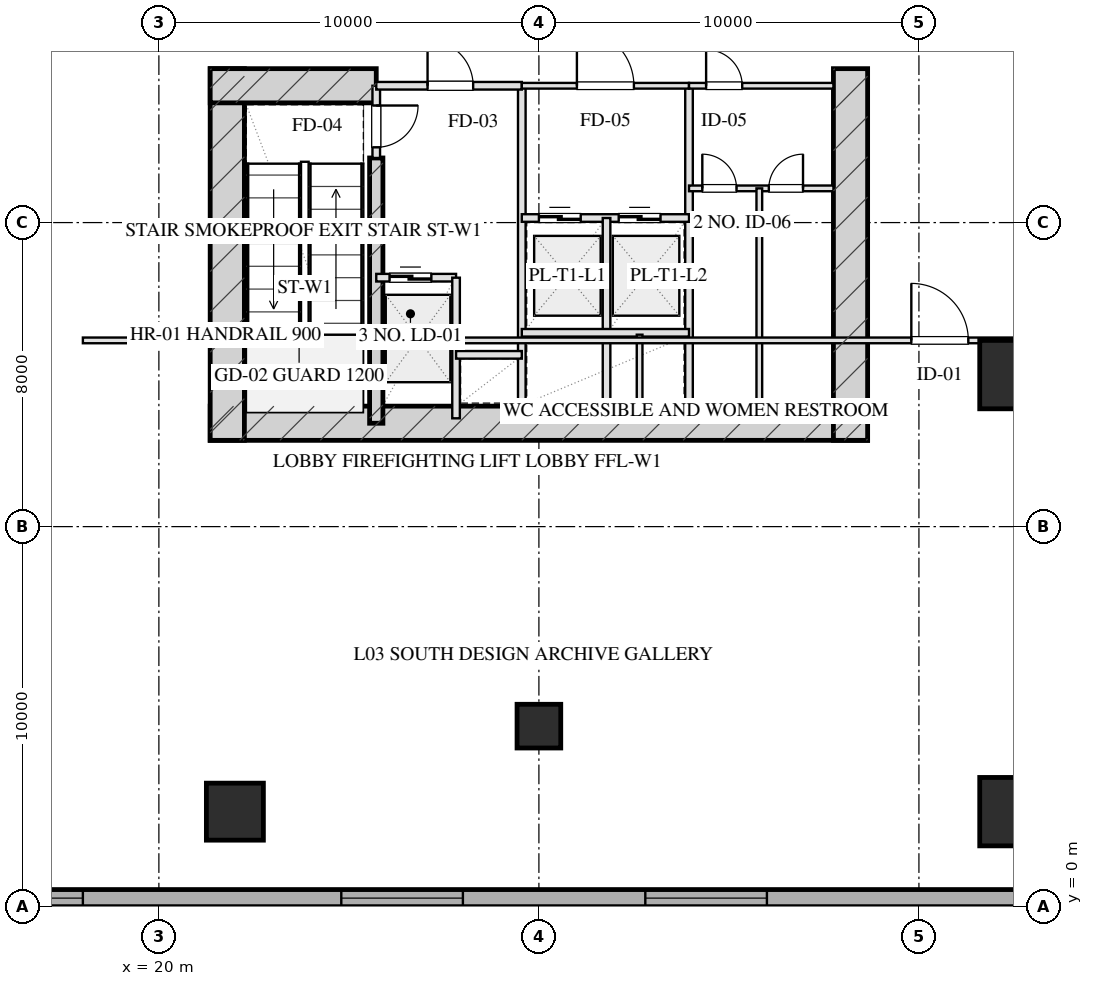
"""IFC4 building model, lengths in metres.
Left out: names, types, materials, properties, quantities, classifications, styles, units other than length and angle.
Written with IfcOpenShell. Run it as: python <this file> out.ifc"""

import sys

from ifc_helpers import new_model, si_unit, direction, frame, frame_2d, origin, origin_2d, place, context, subcontext, project, spatial, rectangle, hollow_rectangle, extrude, element, fill, save


model = new_model("IFC4")
c1 = context("Model", 3, precision=1e-05, world=origin(), true_north=direction((0.0, 1.0)))
c2 = subcontext(c1, "Body", "Model", "MODEL_VIEW")
j1 = project(units=[si_unit("LENGTHUNIT", "METRE"), si_unit("PLANEANGLEUNIT", "RADIAN")], contexts=[c1])
p1 = place(None, origin())
s1 = spatial("IfcSite", under=j1, at=p1, CompositionType="ELEMENT")
p2 = place(p1, origin())
s2 = spatial("IfcBuilding", under=s1, at=p2, CompositionType="ELEMENT")
p3 = place(p2, frame((0.0, 0.0, 16.5)))
s3 = spatial("IfcBuildingStorey", under=s2, at=p3, CompositionType="ELEMENT", Elevation=16.5)
p4 = place(p3, frame((21.35, 12.72, 0.0), z_axis=(0.0, 0.0, 1.0), x_axis=(1.0, 0.0, 0.0)))
e1 = element("IfcWall", 1, at=p4, inside=s3, PredefinedType="SHEAR", context=c2, shape_type="SweptSolid", body=[
    extrude(rectangle(XDim=17.3, YDim=0.9, at=frame_2d((8.65, 0.0))), origin(), (0.0, 0.0, 1.0), 5.5),
])
for number, where, z_axis, x_axis in (
    (2, (21.8, 22.05, 0.0), (0.0, 0.0, 1.0), (0.0, -1.0, 0.0)),
    (3, (38.2, 22.05, 0.0), (0.0, 0.0, 1.0), (0.0, -1.0, 0.0)),
):
    element("IfcWall", number, at=place(p3, frame(where, z_axis=z_axis, x_axis=x_axis)), inside=s3, PredefinedType="SHEAR", context=c2, shape_type="SweptSolid", body=[
        extrude(rectangle(XDim=9.78, YDim=0.9, at=frame_2d((4.89, 0.0))), origin(), (0.0, 0.0, 1.0), 5.5),
    ])
p5 = place(p3, frame((25.72, 19.7, 0.0), z_axis=(0.0, 0.0, 1.0), x_axis=(0.0, -1.0, 0.0)))
e4 = element("IfcWall", 4, at=p5, inside=s3, PredefinedType="SHEAR", context=c2, shape_type="SweptSolid", body=[
    extrude(rectangle(XDim=6.98, YDim=0.35, at=frame_2d((3.49, 0.0))), origin(), (0.0, 0.0, 1.0), 5.5),
])
p6 = place(p3, frame((21.35, 21.6, 0.0), z_axis=(0.0, 0.0, 1.0), x_axis=(1.0, 0.0, 0.0)))
e5 = element("IfcWall", 5, at=p6, inside=s3, PredefinedType="SHEAR", context=c2, shape_type="SweptSolid", body=[
    extrude(rectangle(XDim=4.37, YDim=0.9, at=frame_2d((2.185, 0.0))), origin(), (0.0, 0.0, 1.0), 5.5),
])
p7 = place(p3, frame((22.0, 2.5, 0.0), z_axis=(0.0, 0.0, 1.0), x_axis=(1.0, 0.0, 0.0)))
e6 = element("IfcColumn", 6, at=p7, inside=s3, PredefinedType="COLUMN", context=c2, shape_type="SweptSolid", body=[
    extrude(rectangle(XDim=1.5, YDim=1.5, at=origin_2d()), origin(), (0.0, 0.0, 1.0), 5.501),
])
for number, where, z_axis, x_axis in (
    (7, (42.5, 2.5, 0.0), (0.0, 0.0, 1.0), (1.0, 0.0, 0.0)),
    (8, (42.5, 14.0, 0.0), (0.0, 0.0, 1.0), (1.0, 0.0, 0.0)),
):
    element("IfcColumn", number, at=place(p3, frame(where, z_axis=z_axis, x_axis=x_axis)), inside=s3, PredefinedType="COLUMN", context=c2, shape_type="SweptSolid", body=[
        extrude(hollow_rectangle(XDim=1.8, YDim=1.8, WallThickness=0.06, at=origin_2d()), origin(), (0.0, 0.0, 1.0), 5.501),
    ])
p8 = place(p3, frame((30.0, 4.75, 0.0), z_axis=(0.0, 0.0, 1.0), x_axis=(1.0, 0.0, 0.0)))
e9 = element("IfcColumn", 9, at=p8, inside=s3, PredefinedType="COLUMN", context=c2, shape_type="SweptSolid", body=[
    extrude(hollow_rectangle(XDim=1.15, YDim=1.15, WallThickness=0.04, at=origin_2d()), origin(), (0.0, 0.0, 1.0), 5.501),
])
p9 = place(p3, frame((120.0, 0.225, 0.0), z_axis=(0.0, 0.0, 1.0), x_axis=(-1.0, 0.0, 0.0)))
e10 = element("IfcWall", 10, at=p9, inside=s3, PredefinedType="SOLIDWALL", context=c2, shape_type="SweptSolid", body=[
    extrude(rectangle(XDim=120.0, YDim=0.45, at=frame_2d((60.0, 0.0))), origin(), (0.0, 0.0, 1.0), 5.2),
])
p10 = place(p9, frame((8.0, 0.0, 0.7)))
e11 = element("IfcOpeningElement", 11, at=p10, cuts=e10, PredefinedType="OPENING", context=c2, shape_type="SweptSolid", body=[
    extrude(rectangle(XDim=3.2, YDim=2.05, at=frame_2d((1.6, 1.025))), frame((0.0, 0.235, 0.0), z_axis=(0.0, -1.0, 0.0), x_axis=(1.0, 0.0, 0.0)), (0.0, 0.0, 1.0), 0.47),
])
p11 = place(p9, frame((16.0, 0.0, 0.7)))
e12 = element("IfcOpeningElement", 12, at=p11, cuts=e10, PredefinedType="OPENING", context=c2, shape_type="SweptSolid", body=[
    extrude(rectangle(XDim=3.2, YDim=2.05, at=frame_2d((1.6, 1.025))), frame((0.0, 0.235, 0.0), z_axis=(0.0, -1.0, 0.0), x_axis=(1.0, 0.0, 0.0)), (0.0, 0.0, 1.0), 0.47),
])
p12 = place(p9, frame((26.0, 0.0, 0.7)))
e13 = element("IfcOpeningElement", 13, at=p12, cuts=e10, PredefinedType="OPENING", context=c2, shape_type="SweptSolid", body=[
    extrude(rectangle(XDim=3.2, YDim=2.05, at=frame_2d((1.6, 1.025))), frame((0.0, 0.235, 0.0), z_axis=(0.0, -1.0, 0.0), x_axis=(1.0, 0.0, 0.0)), (0.0, 0.0, 1.0), 0.47),
])
p13 = place(p9, frame((34.0, 0.0, 0.7)))
e14 = element("IfcOpeningElement", 14, at=p13, cuts=e10, PredefinedType="OPENING", context=c2, shape_type="SweptSolid", body=[
    extrude(rectangle(XDim=3.2, YDim=2.05, at=frame_2d((1.6, 1.025))), frame((0.0, 0.235, 0.0), z_axis=(0.0, -1.0, 0.0), x_axis=(1.0, 0.0, 0.0)), (0.0, 0.0, 1.0), 0.47),
])
p14 = place(p9, frame((84.0, 0.0, 0.7)))
e15 = element("IfcOpeningElement", 15, at=p14, cuts=e10, PredefinedType="OPENING", context=c2, shape_type="SweptSolid", body=[
    extrude(rectangle(XDim=3.2, YDim=2.05, at=frame_2d((1.6, 1.025))), frame((0.0, 0.235, 0.0), z_axis=(0.0, -1.0, 0.0), x_axis=(1.0, 0.0, 0.0)), (0.0, 0.0, 1.0), 0.47),
])
p15 = place(p9, frame((92.0, 0.0, 0.7)))
e16 = element("IfcOpeningElement", 16, at=p15, cuts=e10, PredefinedType="OPENING", context=c2, shape_type="SweptSolid", body=[
    extrude(rectangle(XDim=3.2, YDim=2.05, at=frame_2d((1.6, 1.025))), frame((0.0, 0.235, 0.0), z_axis=(0.0, -1.0, 0.0), x_axis=(1.0, 0.0, 0.0)), (0.0, 0.0, 1.0), 0.47),
])
p16 = place(p9, frame((102.0, 0.0, 0.7)))
e17 = element("IfcOpeningElement", 17, at=p16, cuts=e10, PredefinedType="OPENING", context=c2, shape_type="SweptSolid", body=[
    extrude(rectangle(XDim=3.2, YDim=2.05, at=frame_2d((1.6, 1.025))), frame((0.0, 0.235, 0.0), z_axis=(0.0, -1.0, 0.0), x_axis=(1.0, 0.0, 0.0)), (0.0, 0.0, 1.0), 0.47),
])
p17 = place(p9, frame((110.0, 0.0, 0.7)))
e18 = element("IfcOpeningElement", 18, at=p17, cuts=e10, PredefinedType="OPENING", context=c2, shape_type="SweptSolid", body=[
    extrude(rectangle(XDim=3.2, YDim=2.05, at=frame_2d((1.6, 1.025))), frame((0.0, 0.235, 0.0), z_axis=(0.0, -1.0, 0.0), x_axis=(1.0, 0.0, 0.0)), (0.0, 0.0, 1.0), 0.47),
])
p18 = place(p3, frame((25.72, 21.6, 0.0), z_axis=(0.0, 0.0, 1.0), x_axis=(0.0, -1.0, 0.0)))
e19 = element("IfcWall", 19, at=p18, inside=s3, PredefinedType="PARTITIONING", context=c2, shape_type="SweptSolid", body=[
    extrude(rectangle(XDim=1.9, YDim=0.2, at=frame_2d((0.95, 0.0))), origin(), (0.0, 0.0, 1.0), 5.185),
])
p19 = place(p18, frame((0.52, 0.0, 0.0)))
e20 = element("IfcOpeningElement", 20, at=p19, cuts=e19, PredefinedType="OPENING", context=c2, shape_type="SweptSolid", body=[
    extrude(rectangle(XDim=1.1, YDim=2.05, at=frame_2d((0.55, 1.025))), frame((0.0, 0.11, 0.0), z_axis=(0.0, -1.0, 0.0), x_axis=(1.0, 0.0, 0.0)), (0.0, 0.0, 1.0), 0.22),
])
p20 = place(p3, frame((29.55, 21.6, 0.0), z_axis=(0.0, 0.0, 1.0), x_axis=(0.0, -1.0, 0.0)))
e21 = element("IfcWall", 21, at=p20, inside=s3, PredefinedType="PARTITIONING", context=c2, shape_type="SweptSolid", body=[
    extrude(rectangle(XDim=8.43, YDim=0.2, at=frame_2d((4.215, 0.0))), origin(), (0.0, 0.0, 1.0), 5.185),
])
p21 = place(p3, frame((25.72, 21.6, 0.0), z_axis=(0.0, 0.0, 1.0), x_axis=(1.0, 0.0, 0.0)))
e22 = element("IfcWall", 22, at=p21, inside=s3, PredefinedType="PARTITIONING", context=c2, shape_type="SweptSolid", body=[
    extrude(rectangle(XDim=3.83, YDim=0.2, at=frame_2d((1.915, 0.0))), origin(), (0.0, 0.0, 1.0), 5.185),
])
p22 = place(p21, frame((1.35, 0.0, 0.0)))
e23 = element("IfcOpeningElement", 23, at=p22, cuts=e22, PredefinedType="OPENING", context=c2, shape_type="SweptSolid", body=[
    extrude(rectangle(XDim=1.2, YDim=2.05, at=frame_2d((0.6, 1.025))), frame((0.0, 0.11, 0.0), z_axis=(0.0, -1.0, 0.0), x_axis=(1.0, 0.0, 0.0)), (0.0, 0.0, 1.0), 0.22),
])
p23 = place(p3, frame((25.72, 16.55, 0.0), z_axis=(0.0, 0.0, 1.0), x_axis=(1.0, 0.0, 0.0)))
e24 = element("IfcWall", 24, at=p23, inside=s3, PredefinedType="PARTITIONING", context=c2, shape_type="SweptSolid", body=[
    extrude(rectangle(XDim=2.1, YDim=0.2, at=frame_2d((1.05, 0.0))), origin(), (0.0, 0.0, 1.0), 5.185),
])
p24 = place(p23, frame((0.35, 0.0, 0.0)))
e25 = element("IfcOpeningElement", 25, at=p24, cuts=e24, PredefinedType="OPENING", context=c2, shape_type="SweptSolid", body=[
    extrude(rectangle(XDim=1.1, YDim=2.05, at=frame_2d((0.55, 1.025))), frame((0.0, 0.11, 0.0), z_axis=(0.0, -1.0, 0.0), x_axis=(1.0, 0.0, 0.0)), (0.0, 0.0, 1.0), 0.22),
])
p25 = place(p3, frame((27.82, 16.55, 0.0), z_axis=(0.0, 0.0, 1.0), x_axis=(0.0, -1.0, 0.0)))
e26 = element("IfcWall", 26, at=p25, inside=s3, PredefinedType="PARTITIONING", context=c2, shape_type="SweptSolid", body=[
    extrude(rectangle(XDim=3.7, YDim=0.2, at=frame_2d((1.85, 0.0))), origin(), (0.0, 0.0, 1.0), 5.185),
])
p26 = place(p3, frame((27.82, 14.52, 0.0), z_axis=(0.0, 0.0, 1.0), x_axis=(1.0, 0.0, 0.0)))
e27 = element("IfcWall", 27, at=p26, inside=s3, PredefinedType="PARTITIONING", context=c2, shape_type="SweptSolid", body=[
    extrude(rectangle(XDim=1.73, YDim=0.2, at=frame_2d((0.865, 0.0))), origin(), (0.0, 0.0, 1.0), 5.185),
])
p27 = place(p3, frame((33.95, 21.6, 0.0), z_axis=(0.0, 0.0, 1.0), x_axis=(0.0, -1.0, 0.0)))
e28 = element("IfcWall", 28, at=p27, inside=s3, PredefinedType="PARTITIONING", context=c2, shape_type="SweptSolid", body=[
    extrude(rectangle(XDim=8.43, YDim=0.2, at=frame_2d((4.215, 0.0))), origin(), (0.0, 0.0, 1.0), 5.185),
])
p28 = place(p3, frame((29.55, 21.6, 0.0), z_axis=(0.0, 0.0, 1.0), x_axis=(1.0, 0.0, 0.0)))
e29 = element("IfcWall", 29, at=p28, inside=s3, PredefinedType="PARTITIONING", context=c2, shape_type="SweptSolid", body=[
    extrude(rectangle(XDim=4.4, YDim=0.15, at=frame_2d((2.2, 0.0))), origin(), (0.0, 0.0, 1.0), 5.185),
])
p29 = place(p28, frame((1.45, 0.0, 0.0)))
e30 = element("IfcOpeningElement", 30, at=p29, cuts=e29, PredefinedType="OPENING", context=c2, shape_type="SweptSolid", body=[
    extrude(rectangle(XDim=1.5, YDim=2.05, at=frame_2d((0.75, 1.025))), frame((0.0, 0.085, 0.0), z_axis=(0.0, -1.0, 0.0), x_axis=(1.0, 0.0, 0.0)), (0.0, 0.0, 1.0), 0.17),
])
p30 = place(p3, frame((29.55, 18.12, 0.0), z_axis=(0.0, 0.0, 1.0), x_axis=(1.0, 0.0, 0.0)))
e31 = element("IfcWall", 31, at=p30, inside=s3, PredefinedType="PARTITIONING", context=c2, shape_type="SweptSolid", body=[
    extrude(rectangle(XDim=4.4, YDim=0.2, at=frame_2d((2.2, 0.0))), origin(), (0.0, 0.0, 1.0), 5.185),
])
p31 = place(p30, frame((0.45, 0.0, 0.0)))
e32 = element("IfcOpeningElement", 32, at=p31, cuts=e31, PredefinedType="OPENING", context=c2, shape_type="SweptSolid", body=[
    extrude(rectangle(XDim=1.1, YDim=2.05, at=frame_2d((0.55, 1.025))), frame((0.0, 0.11, 0.0), z_axis=(0.0, -1.0, 0.0), x_axis=(1.0, 0.0, 0.0)), (0.0, 0.0, 1.0), 0.22),
])
p32 = place(p30, frame((2.55, 0.0, 0.0)))
e33 = element("IfcOpeningElement", 33, at=p32, cuts=e31, PredefinedType="OPENING", context=c2, shape_type="SweptSolid", body=[
    extrude(rectangle(XDim=1.1, YDim=2.05, at=frame_2d((0.55, 1.025))), frame((0.0, 0.11, 0.0), z_axis=(0.0, -1.0, 0.0), x_axis=(1.0, 0.0, 0.0)), (0.0, 0.0, 1.0), 0.22),
])
p33 = place(p3, frame((31.78, 18.12, 0.0), z_axis=(0.0, 0.0, 1.0), x_axis=(0.0, -1.0, 0.0)))
e34 = element("IfcWall", 34, at=p33, inside=s3, PredefinedType="PARTITIONING", context=c2, shape_type="SweptSolid", body=[
    extrude(rectangle(XDim=4.95, YDim=0.2, at=frame_2d((2.475, 0.0))), origin(), (0.0, 0.0, 1.0), 5.185),
])
p34 = place(p3, frame((29.55, 15.1, 0.0), z_axis=(0.0, 0.0, 1.0), x_axis=(1.0, 0.0, 0.0)))
e35 = element("IfcWall", 35, at=p34, inside=s3, PredefinedType="PARTITIONING", context=c2, shape_type="SweptSolid", body=[
    extrude(rectangle(XDim=4.4, YDim=0.2, at=frame_2d((2.2, 0.0))), origin(), (0.0, 0.0, 1.0), 5.185),
])
p35 = place(p3, frame((32.65, 15.05, 0.0), z_axis=(0.0, 0.0, 1.0), x_axis=(0.0, -1.0, 0.0)))
e36 = element("IfcWall", 36, at=p35, inside=s3, PredefinedType="PARTITIONING", context=c2, shape_type="SweptSolid", body=[
    extrude(rectangle(XDim=1.88, YDim=0.15, at=frame_2d((0.94, 0.0))), origin(), (0.0, 0.0, 1.0), 5.185),
])
p36 = place(p3, frame((33.95, 21.6, 0.0), z_axis=(0.0, 0.0, 1.0), x_axis=(1.0, 0.0, 0.0)))
e37 = element("IfcWall", 37, at=p36, inside=s3, PredefinedType="PARTITIONING", context=c2, shape_type="SweptSolid", body=[
    extrude(rectangle(XDim=3.8, YDim=0.15, at=frame_2d((1.9, 0.0))), origin(), (0.0, 0.0, 1.0), 5.185),
])
p37 = place(p36, frame((0.45, 0.0, 0.0)))
e38 = element("IfcOpeningElement", 38, at=p37, cuts=e37, PredefinedType="OPENING", context=c2, shape_type="SweptSolid", body=[
    extrude(rectangle(XDim=0.95, YDim=2.05, at=frame_2d((0.475, 1.025))), frame((0.0, 0.085, 0.0), z_axis=(0.0, -1.0, 0.0), x_axis=(1.0, 0.0, 0.0)), (0.0, 0.0, 1.0), 0.17),
])
p38 = place(p3, frame((33.95, 18.9, 0.0), z_axis=(0.0, 0.0, 1.0), x_axis=(1.0, 0.0, 0.0)))
e39 = element("IfcWall", 39, at=p38, inside=s3, PredefinedType="PARTITIONING", context=c2, shape_type="SweptSolid", body=[
    extrude(rectangle(XDim=3.8, YDim=0.15, at=frame_2d((1.9, 0.0))), origin(), (0.0, 0.0, 1.0), 5.185),
])
p39 = place(p38, frame((0.35, 0.0, 0.0)))
e40 = element("IfcOpeningElement", 40, at=p39, cuts=e39, PredefinedType="OPENING", context=c2, shape_type="SweptSolid", body=[
    extrude(rectangle(XDim=0.9, YDim=2.05, at=frame_2d((0.45, 1.025))), frame((0.0, 0.085, 0.0), z_axis=(0.0, -1.0, 0.0), x_axis=(1.0, 0.0, 0.0)), (0.0, 0.0, 1.0), 0.17),
])
p40 = place(p38, frame((2.1, 0.0, 0.0)))
e41 = element("IfcOpeningElement", 41, at=p40, cuts=e39, PredefinedType="OPENING", context=c2, shape_type="SweptSolid", body=[
    extrude(rectangle(XDim=0.9, YDim=2.05, at=frame_2d((0.45, 1.025))), frame((0.0, 0.085, 0.0), z_axis=(0.0, -1.0, 0.0), x_axis=(1.0, 0.0, 0.0)), (0.0, 0.0, 1.0), 0.17),
])
p41 = place(p3, frame((35.8, 18.9, 0.0), z_axis=(0.0, 0.0, 1.0), x_axis=(0.0, -1.0, 0.0)))
e42 = element("IfcWall", 42, at=p41, inside=s3, PredefinedType="PARTITIONING", context=c2, shape_type="SweptSolid", body=[
    extrude(rectangle(XDim=5.73, YDim=0.15, at=frame_2d((2.865, 0.0))), origin(), (0.0, 0.0, 1.0), 5.185),
])
p42 = place(p3, frame((18.0, 14.9, 0.0), z_axis=(0.0, 0.0, 1.0), x_axis=(1.0, 0.0, 0.0)))
e43 = element("IfcWall", 43, at=p42, inside=s3, PredefinedType="PARTITIONING", context=c2, shape_type="SweptSolid", body=[
    extrude(rectangle(XDim=88.0, YDim=0.15, at=frame_2d((44.0, 0.0))), origin(), (0.0, 0.0, 1.0), 2.325),
])
p43 = place(p42, frame((21.8, 0.0, 0.0)))
e44 = element("IfcOpeningElement", 44, at=p43, cuts=e43, PredefinedType="OPENING", context=c2, shape_type="SweptSolid", body=[
    extrude(rectangle(XDim=1.5, YDim=2.05, at=frame_2d((0.75, 1.025))), frame((0.0, 0.085, 0.0), z_axis=(0.0, -1.0, 0.0), x_axis=(1.0, 0.0, 0.0)), (0.0, 0.0, 1.0), 0.17),
])
p44 = place(p14, origin())
e45 = element("IfcWindow", 45, at=p44, inside=s3, PartitioningType="TRIPLE_PANEL_VERTICAL", PredefinedType="WINDOW", context=c2, shape_type="SweptSolid", body=[
    extrude(rectangle(XDim=3.2, YDim=2.05, at=frame_2d((1.6, 1.025))), frame((0.0, 0.03, 0.0), z_axis=(0.0, -1.0, 0.0), x_axis=(1.0, 0.0, 0.0)), (0.0, 0.0, 1.0), 0.06),
])
fill(e15, e45)
p45 = place(p15, origin())
e46 = element("IfcWindow", 46, at=p45, inside=s3, PartitioningType="TRIPLE_PANEL_VERTICAL", PredefinedType="WINDOW", context=c2, shape_type="SweptSolid", body=[
    extrude(rectangle(XDim=3.2, YDim=2.05, at=frame_2d((1.6, 1.025))), frame((0.0, 0.03, 0.0), z_axis=(0.0, -1.0, 0.0), x_axis=(1.0, 0.0, 0.0)), (0.0, 0.0, 1.0), 0.06),
])
fill(e16, e46)
p46 = place(p16, origin())
e47 = element("IfcWindow", 47, at=p46, inside=s3, PartitioningType="TRIPLE_PANEL_VERTICAL", PredefinedType="WINDOW", context=c2, shape_type="SweptSolid", body=[
    extrude(rectangle(XDim=3.2, YDim=2.05, at=frame_2d((1.6, 1.025))), frame((0.0, 0.03, 0.0), z_axis=(0.0, -1.0, 0.0), x_axis=(1.0, 0.0, 0.0)), (0.0, 0.0, 1.0), 0.06),
])
fill(e17, e47)
p47 = place(p19, origin())
e48 = element("IfcDoor", 48, at=p47, inside=s3, OperationType="SINGLE_SWING_LEFT", PredefinedType="DOOR", context=c2, shape_type="SweptSolid", body=[
    extrude(rectangle(XDim=1.1, YDim=2.05, at=frame_2d((0.55, 1.025))), frame((0.0, 0.025, 0.0), z_axis=(0.0, -1.0, 0.0), x_axis=(1.0, 0.0, 0.0)), (0.0, 0.0, 1.0), 0.05),
])
fill(e20, e48)
p48 = place(p22, origin())
e49 = element("IfcDoor", 49, at=p48, inside=s3, OperationType="SINGLE_SWING_LEFT", PredefinedType="DOOR", context=c2, shape_type="SweptSolid", body=[
    extrude(rectangle(XDim=1.2, YDim=2.05, at=frame_2d((0.6, 1.025))), frame((0.0, 0.025, 0.0), z_axis=(0.0, -1.0, 0.0), x_axis=(1.0, 0.0, 0.0)), (0.0, 0.0, 1.0), 0.05),
])
fill(e23, e49)
p49 = place(p24, origin())
e50 = element("IfcDoor", 50, at=p49, inside=s3, OperationType="DOUBLE_DOOR_SLIDING", PredefinedType="DOOR", context=c2, shape_type="SweptSolid", body=[
    extrude(rectangle(XDim=1.1, YDim=2.05, at=frame_2d((0.55, 1.025))), frame((0.0, 0.025, 0.0), z_axis=(0.0, -1.0, 0.0), x_axis=(1.0, 0.0, 0.0)), (0.0, 0.0, 1.0), 0.05),
])
fill(e25, e50)
p50 = place(p29, origin())
e51 = element("IfcDoor", 51, at=p50, inside=s3, OperationType="SINGLE_SWING_LEFT", PredefinedType="DOOR", context=c2, shape_type="SweptSolid", body=[
    extrude(rectangle(XDim=1.5, YDim=2.05, at=frame_2d((0.75, 1.025))), frame((0.0, 0.025, 0.0), z_axis=(0.0, -1.0, 0.0), x_axis=(1.0, 0.0, 0.0)), (0.0, 0.0, 1.0), 0.05),
])
fill(e30, e51)
p51 = place(p31, origin())
e52 = element("IfcDoor", 52, at=p51, inside=s3, OperationType="DOUBLE_DOOR_SLIDING", PredefinedType="DOOR", context=c2, shape_type="SweptSolid", body=[
    extrude(rectangle(XDim=1.1, YDim=2.05, at=frame_2d((0.55, 1.025))), frame((0.0, 0.025, 0.0), z_axis=(0.0, -1.0, 0.0), x_axis=(1.0, 0.0, 0.0)), (0.0, 0.0, 1.0), 0.05),
])
fill(e32, e52)
p52 = place(p32, origin())
e53 = element("IfcDoor", 53, at=p52, inside=s3, OperationType="DOUBLE_DOOR_SLIDING", PredefinedType="DOOR", context=c2, shape_type="SweptSolid", body=[
    extrude(rectangle(XDim=1.1, YDim=2.05, at=frame_2d((0.55, 1.025))), frame((0.0, 0.025, 0.0), z_axis=(0.0, -1.0, 0.0), x_axis=(1.0, 0.0, 0.0)), (0.0, 0.0, 1.0), 0.05),
])
fill(e33, e53)
p53 = place(p37, origin())
e54 = element("IfcDoor", 54, at=p53, inside=s3, OperationType="SINGLE_SWING_LEFT", PredefinedType="DOOR", context=c2, shape_type="SweptSolid", body=[
    extrude(rectangle(XDim=0.95, YDim=2.05, at=frame_2d((0.475, 1.025))), frame((0.0, 0.025, 0.0), z_axis=(0.0, -1.0, 0.0), x_axis=(1.0, 0.0, 0.0)), (0.0, 0.0, 1.0), 0.05),
])
fill(e38, e54)
p54 = place(p39, origin())
e55 = element("IfcDoor", 55, at=p54, inside=s3, OperationType="SINGLE_SWING_LEFT", PredefinedType="DOOR", context=c2, shape_type="SweptSolid", body=[
    extrude(rectangle(XDim=0.9, YDim=2.05, at=frame_2d((0.45, 1.025))), frame((0.0, 0.025, 0.0), z_axis=(0.0, -1.0, 0.0), x_axis=(1.0, 0.0, 0.0)), (0.0, 0.0, 1.0), 0.05),
])
fill(e40, e55)
p55 = place(p40, origin())
e56 = element("IfcDoor", 56, at=p55, inside=s3, OperationType="SINGLE_SWING_RIGHT", PredefinedType="DOOR", context=c2, shape_type="SweptSolid", body=[
    extrude(rectangle(XDim=0.9, YDim=2.05, at=frame_2d((0.45, 1.025))), frame((0.0, 0.025, 0.0), z_axis=(0.0, -1.0, 0.0), x_axis=(1.0, 0.0, 0.0)), (0.0, 0.0, 1.0), 0.05),
])
fill(e41, e56)
p56 = place(p43, origin())
e57 = element("IfcDoor", 57, at=p56, inside=s3, OperationType="SINGLE_SWING_LEFT", PredefinedType="DOOR", context=c2, shape_type="SweptSolid", body=[
    extrude(rectangle(XDim=1.5, YDim=2.05, at=frame_2d((0.75, 1.025))), frame((0.0, 0.025, 0.0), z_axis=(0.0, -1.0, 0.0), x_axis=(1.0, 0.0, 0.0)), (0.0, 0.0, 1.0), 0.05),
])
fill(e44, e57)
save(model, sys.argv[1])
